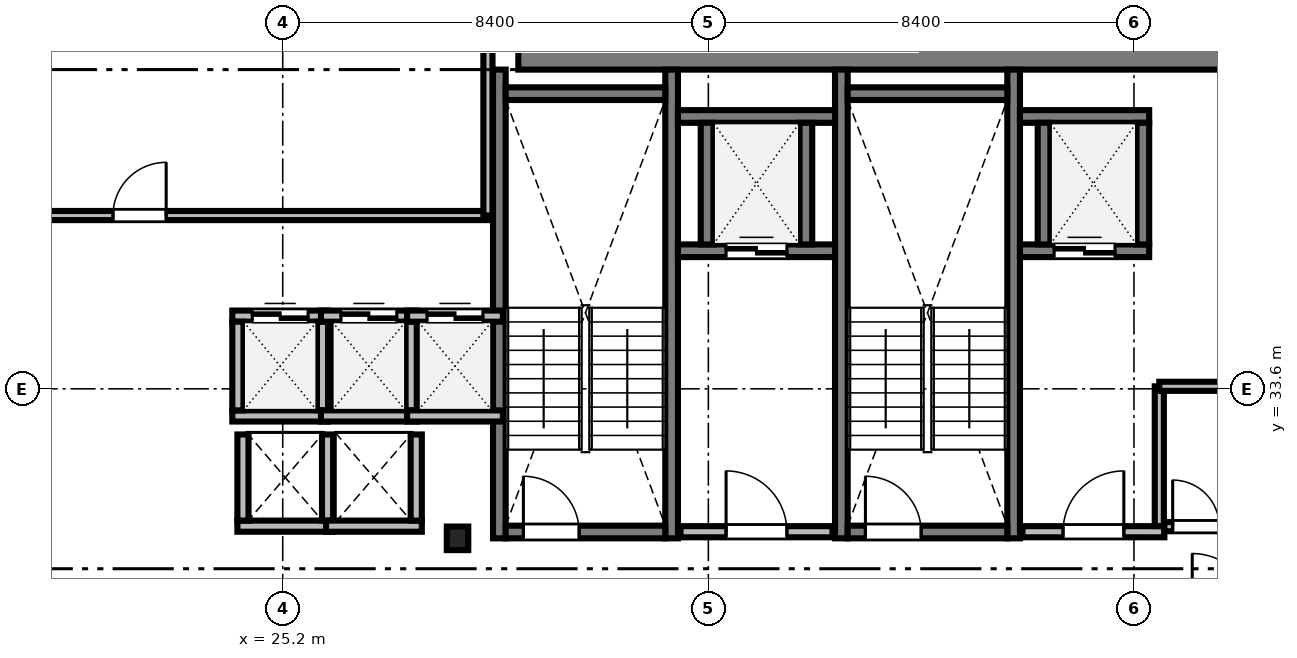
"""IFC4 building model, lengths in metres.
Left out: names, types, materials, properties, quantities, classifications, styles, units other than length and angle.
Written with IfcOpenShell. Run it as: python <this file> out.ifc"""

import sys

from ifc_helpers import new_model, si_unit, direction, frame, frame_2d, origin, origin_2d, place, context, subcontext, project, spatial, rectangle, i_section, extrude, source, transform, mapped, element, fill, save


model = new_model("IFC4")
c1 = context("Model", 3, precision=1e-05, world=origin(), true_north=direction((0.0, 1.0)))
c2 = subcontext(c1, "Body", "Model", "MODEL_VIEW")
j1 = project(units=[si_unit("LENGTHUNIT", "METRE"), si_unit("PLANEANGLEUNIT", "RADIAN")], contexts=[c1])
p1 = place(None, origin())
s1 = spatial("IfcSite", under=j1, at=p1, CompositionType="ELEMENT")
p2 = place(p1, origin())
s2 = spatial("IfcBuilding", under=s1, at=p2, CompositionType="ELEMENT")
p3 = place(p2, frame((0.0, 0.0, 107.5)))
s3 = spatial("IfcBuildingStorey", under=s2, at=p3, CompositionType="ELEMENT", Elevation=107.5)
m1 = source(origin(), c2, "Body", "SweptSolid", [
    extrude(rectangle(XDim=17.52, YDim=0.8, at=frame_2d((8.76, 0.0))), origin(), (0.0, 0.0, 1.0), 3.56),
])
p4 = place(p3, frame((29.85, 40.3, 0.0), z_axis=(0.0, 0.0, 1.0), x_axis=(1.0, 0.0, 0.0)))
e1 = element("IfcWall", 1, at=p4, inside=s3, PredefinedType="SHEAR", context=c2, shape_type="MappedRepresentation", body=[
    mapped(m1, transform((0.0, 0.0, 0.0), scale=1.0)),
])
m2 = source(origin(), c2, "Body", "SweptSolid", [
    extrude(i_section(OverallWidth=0.424, OverallDepth=0.465, WebThickness=0.035, FlangeThickness=0.056, FilletRadius=0.015, at=origin_2d()), origin(), (0.0, 0.0, 1.0), 3.56),
])
p5 = place(p3, frame((28.65, 30.65, 0.0), z_axis=(0.0, 0.0, 1.0), x_axis=(1.0, 0.0, 0.0)))
e2 = element("IfcColumn", 2, at=p5, inside=s3, PredefinedType="COLUMN", context=c2, shape_type="MappedRepresentation", body=[
    mapped(m2, transform((0.0, 0.0, 0.0), scale=1.0)),
])
m3 = source(origin(), c2, "Body", "SweptSolid", [
    extrude(rectangle(XDim=9.25, YDim=0.25, at=frame_2d((4.625, 0.0))), origin(), (0.0, 0.0, 1.0), 3.6),
])
for number, where, z_axis, x_axis in (
    (3, (29.475, 30.65, 0.0), (0.0, 0.0, 1.0), (0.0, 1.0, 0.0)),
    (4, (32.875, 30.65, 0.0), (0.0, 0.0, 1.0), (0.0, 1.0, 0.0)),
):
    element("IfcWall", number, at=place(p3, frame(where, z_axis=z_axis, x_axis=x_axis)), inside=s3, PredefinedType="SOLIDWALL", context=c2, shape_type="MappedRepresentation", body=[
        mapped(m3, transform((0.0, 0.0, 0.0), scale=1.0)),
    ])
m4 = source(origin(), c2, "Body", "SweptSolid", [
    extrude(rectangle(XDim=3.15, YDim=0.25, at=frame_2d((1.575, 0.0))), origin(), (0.0, 0.0, 1.0), 3.6),
])
p6 = place(p3, frame((29.6, 39.425, 0.0), z_axis=(0.0, 0.0, 1.0), x_axis=(1.0, 0.0, 0.0)))
e5 = element("IfcWall", 5, at=p6, inside=s3, PredefinedType="SOLIDWALL", context=c2, shape_type="MappedRepresentation", body=[
    mapped(m4, transform((0.0, 0.0, 0.0), scale=1.0)),
])
p7 = place(p3, frame((29.6, 30.775, 0.0), z_axis=(0.0, 0.0, 1.0), x_axis=(1.0, 0.0, 0.0)))
e6 = element("IfcWall", 6, at=p7, inside=s3, PredefinedType="SOLIDWALL", context=c2, shape_type="MappedRepresentation", body=[
    mapped(m4, transform((0.0, 0.0, 0.0), scale=1.0)),
])
m5 = source(origin(), c2, "Body", "SweptSolid", [
    extrude(rectangle(XDim=1.1, YDim=2.2, at=frame_2d((0.55, 1.1))), frame((0.0, 0.135, 0.0), z_axis=(0.0, -1.0, 0.0), x_axis=(1.0, 0.0, 0.0)), (0.0, 0.0, 1.0), 0.27),
])
p8 = place(p7, frame((0.35, 0.0, 0.0)))
e7 = element("IfcOpeningElement", 7, at=p8, cuts=e6, PredefinedType="OPENING", context=c2, shape_type="MappedRepresentation", body=[
    mapped(m5, transform((0.0, 0.0, 0.0), scale=1.0)),
])
for number, where, z_axis, x_axis in (
    (8, (36.225, 30.65, 0.0), (0.0, 0.0, 1.0), (0.0, 1.0, 0.0)),
    (9, (39.625, 30.65, 0.0), (0.0, 0.0, 1.0), (0.0, 1.0, 0.0)),
):
    element("IfcWall", number, at=place(p3, frame(where, z_axis=z_axis, x_axis=x_axis)), inside=s3, PredefinedType="SOLIDWALL", context=c2, shape_type="MappedRepresentation", body=[
        mapped(m3, transform((0.0, 0.0, 0.0), scale=1.0)),
    ])
p9 = place(p3, frame((36.35, 39.425, 0.0), z_axis=(0.0, 0.0, 1.0), x_axis=(1.0, 0.0, 0.0)))
e10 = element("IfcWall", 10, at=p9, inside=s3, PredefinedType="SOLIDWALL", context=c2, shape_type="MappedRepresentation", body=[
    mapped(m4, transform((0.0, 0.0, 0.0), scale=1.0)),
])
p10 = place(p3, frame((36.35, 30.775, 0.0), z_axis=(0.0, 0.0, 1.0), x_axis=(1.0, 0.0, 0.0)))
e11 = element("IfcWall", 11, at=p10, inside=s3, PredefinedType="SOLIDWALL", context=c2, shape_type="MappedRepresentation", body=[
    mapped(m4, transform((0.0, 0.0, 0.0), scale=1.0)),
])
p11 = place(p10, frame((0.35, 0.0, 0.0)))
e12 = element("IfcOpeningElement", 12, at=p11, cuts=e11, PredefinedType="OPENING", context=c2, shape_type="MappedRepresentation", body=[
    mapped(m5, transform((0.0, 0.0, 0.0), scale=1.0)),
])
m6 = source(origin(), c2, "Body", "SweptSolid", [
    extrude(rectangle(XDim=3.0, YDim=0.22, at=frame_2d((1.5, 0.0))), origin(), (0.0, 0.0, 1.0), 3.56),
])
p12 = place(p3, frame((33.05, 30.78, 0.0), z_axis=(0.0, 0.0, 1.0), x_axis=(1.0, 0.0, 0.0)))
e13 = element("IfcWall", 13, at=p12, inside=s3, PredefinedType="SOLIDWALL", context=c2, shape_type="MappedRepresentation", body=[
    mapped(m6, transform((0.0, 0.0, 0.0), scale=1.0)),
])
m7 = source(origin(), c2, "Body", "SweptSolid", [
    extrude(rectangle(XDim=1.2, YDim=2.2, at=frame_2d((0.6, 1.1))), frame((0.0, 0.12, 0.0), z_axis=(0.0, -1.0, 0.0), x_axis=(1.0, 0.0, 0.0)), (0.0, 0.0, 1.0), 0.24),
])
p13 = place(p12, frame((0.9, 0.0, 0.0)))
e14 = element("IfcOpeningElement", 14, at=p13, cuts=e13, PredefinedType="OPENING", context=c2, shape_type="MappedRepresentation", body=[
    mapped(m7, transform((0.0, 0.0, 0.0), scale=1.0)),
])
m8 = source(origin(), c2, "Body", "SweptSolid", [
    extrude(rectangle(XDim=2.8, YDim=0.22, at=frame_2d((1.4, 0.0))), origin(), (0.0, 0.0, 1.0), 3.56),
])
p14 = place(p3, frame((39.8, 30.78, 0.0), z_axis=(0.0, 0.0, 1.0), x_axis=(1.0, 0.0, 0.0)))
e15 = element("IfcWall", 15, at=p14, inside=s3, PredefinedType="SOLIDWALL", context=c2, shape_type="MappedRepresentation", body=[
    mapped(m8, transform((0.0, 0.0, 0.0), scale=1.0)),
])
p15 = place(p14, frame((0.8, 0.0, 0.0)))
e16 = element("IfcOpeningElement", 16, at=p15, cuts=e15, PredefinedType="OPENING", context=c2, shape_type="MappedRepresentation", body=[
    mapped(m7, transform((0.0, 0.0, 0.0), scale=1.0)),
])
m9 = source(origin(), c2, "Body", "SweptSolid", [
    extrude(rectangle(XDim=1.89, YDim=0.22, at=frame_2d((0.945, 0.0))), origin(), (0.0, 0.0, 1.0), 3.56),
])
p16 = place(p3, frame((24.205, 33.065, 0.0), z_axis=(0.0, 0.0, 1.0), x_axis=(1.0, 0.0, 0.0)))
e17 = element("IfcWall", 17, at=p16, inside=s3, PredefinedType="SOLIDWALL", context=c2, shape_type="MappedRepresentation", body=[
    mapped(m9, transform((0.0, 0.0, 0.0), scale=1.0)),
])
p17 = place(p3, frame((24.205, 35.035, 0.0), z_axis=(0.0, 0.0, 1.0), x_axis=(1.0, 0.0, 0.0)))
e18 = element("IfcWall", 18, at=p17, inside=s3, PredefinedType="SOLIDWALL", context=c2, shape_type="MappedRepresentation", body=[
    mapped(m9, transform((0.0, 0.0, 0.0), scale=1.0)),
])
m10 = source(origin(), c2, "Body", "SweptSolid", [
    extrude(rectangle(XDim=1.1, YDim=2.2, at=frame_2d((0.55, 1.1))), frame((0.0, 0.12, 0.0), z_axis=(0.0, -1.0, 0.0), x_axis=(1.0, 0.0, 0.0)), (0.0, 0.0, 1.0), 0.24),
])
p18 = place(p17, frame((0.395, 0.0, 0.0)))
e19 = element("IfcOpeningElement", 19, at=p18, cuts=e18, PredefinedType="OPENING", context=c2, shape_type="MappedRepresentation", body=[
    mapped(m10, transform((0.0, 0.0, 0.0), scale=1.0)),
])
m11 = source(origin(), c2, "Body", "SweptSolid", [
    extrude(rectangle(XDim=1.75, YDim=0.22, at=frame_2d((0.875, 0.0))), origin(), (0.0, 0.0, 1.0), 3.56),
])
for number, where, z_axis, x_axis in (
    (20, (24.315, 33.175, 0.0), (0.0, 0.0, 1.0), (0.0, 1.0, 0.0)),
    (21, (25.985, 33.175, 0.0), (0.0, 0.0, 1.0), (0.0, 1.0, 0.0)),
):
    element("IfcWall", number, at=place(p3, frame(where, z_axis=z_axis, x_axis=x_axis)), inside=s3, PredefinedType="SOLIDWALL", context=c2, shape_type="MappedRepresentation", body=[
        mapped(m11, transform((0.0, 0.0, 0.0), scale=1.0)),
    ])
p19 = place(p3, frame((25.955, 33.065, 0.0), z_axis=(0.0, 0.0, 1.0), x_axis=(1.0, 0.0, 0.0)))
e22 = element("IfcWall", 22, at=p19, inside=s3, PredefinedType="SOLIDWALL", context=c2, shape_type="MappedRepresentation", body=[
    mapped(m9, transform((0.0, 0.0, 0.0), scale=1.0)),
])
p20 = place(p3, frame((25.955, 35.035, 0.0), z_axis=(0.0, 0.0, 1.0), x_axis=(1.0, 0.0, 0.0)))
e23 = element("IfcWall", 23, at=p20, inside=s3, PredefinedType="SOLIDWALL", context=c2, shape_type="MappedRepresentation", body=[
    mapped(m9, transform((0.0, 0.0, 0.0), scale=1.0)),
])
p21 = place(p20, frame((0.395, 0.0, 0.0)))
e24 = element("IfcOpeningElement", 24, at=p21, cuts=e23, PredefinedType="OPENING", context=c2, shape_type="MappedRepresentation", body=[
    mapped(m10, transform((0.0, 0.0, 0.0), scale=1.0)),
])
p22 = place(p3, frame((27.735, 33.175, 0.0), z_axis=(0.0, 0.0, 1.0), x_axis=(0.0, 1.0, 0.0)))
e25 = element("IfcWall", 25, at=p22, inside=s3, PredefinedType="SOLIDWALL", context=c2, shape_type="MappedRepresentation", body=[
    mapped(m11, transform((0.0, 0.0, 0.0), scale=1.0)),
])
p23 = place(p3, frame((27.655, 33.065, 0.0), z_axis=(0.0, 0.0, 1.0), x_axis=(1.0, 0.0, 0.0)))
e26 = element("IfcWall", 26, at=p23, inside=s3, PredefinedType="SOLIDWALL", context=c2, shape_type="MappedRepresentation", body=[
    mapped(m9, transform((0.0, 0.0, 0.0), scale=1.0)),
])
p24 = place(p3, frame((27.655, 35.035, 0.0), z_axis=(0.0, 0.0, 1.0), x_axis=(1.0, 0.0, 0.0)))
e27 = element("IfcWall", 27, at=p24, inside=s3, PredefinedType="SOLIDWALL", context=c2, shape_type="MappedRepresentation", body=[
    mapped(m9, transform((0.0, 0.0, 0.0), scale=1.0)),
])
p25 = place(p24, frame((0.395, 0.0, 0.0)))
e28 = element("IfcOpeningElement", 28, at=p25, cuts=e27, PredefinedType="OPENING", context=c2, shape_type="MappedRepresentation", body=[
    mapped(m10, transform((0.0, 0.0, 0.0), scale=1.0)),
])
m12 = source(origin(), c2, "Body", "SweptSolid", [
    extrude(rectangle(XDim=3.1, YDim=0.25, at=frame_2d((1.55, 0.0))), origin(), (0.0, 0.0, 1.0), 3.56),
])
p26 = place(p3, frame((33.0, 36.325, 0.0), z_axis=(0.0, 0.0, 1.0), x_axis=(1.0, 0.0, 0.0)))
e29 = element("IfcWall", 29, at=p26, inside=s3, PredefinedType="SOLIDWALL", context=c2, shape_type="MappedRepresentation", body=[
    mapped(m12, transform((0.0, 0.0, 0.0), scale=1.0)),
])
m13 = source(origin(), c2, "Body", "SweptSolid", [
    extrude(rectangle(XDim=1.2, YDim=2.25, at=frame_2d((0.6, 1.125))), frame((0.0, 0.135, 0.0), z_axis=(0.0, -1.0, 0.0), x_axis=(1.0, 0.0, 0.0)), (0.0, 0.0, 1.0), 0.27),
])
p27 = place(p26, frame((0.95, 0.0, 0.0)))
e30 = element("IfcOpeningElement", 30, at=p27, cuts=e29, PredefinedType="OPENING", context=c2, shape_type="MappedRepresentation", body=[
    mapped(m13, transform((0.0, 0.0, 0.0), scale=1.0)),
])
p28 = place(p3, frame((33.0, 38.975, 0.0), z_axis=(0.0, 0.0, 1.0), x_axis=(1.0, 0.0, 0.0)))
e31 = element("IfcWall", 31, at=p28, inside=s3, PredefinedType="SOLIDWALL", context=c2, shape_type="MappedRepresentation", body=[
    mapped(m12, transform((0.0, 0.0, 0.0), scale=1.0)),
])
m14 = source(origin(), c2, "Body", "SweptSolid", [
    extrude(rectangle(XDim=2.4, YDim=0.25, at=frame_2d((1.2, 0.0))), origin(), (0.0, 0.0, 1.0), 3.56),
])
for number, where, z_axis, x_axis in (
    (32, (33.575, 36.45, 0.0), (0.0, 0.0, 1.0), (0.0, 1.0, 0.0)),
    (33, (35.525, 36.45, 0.0), (0.0, 0.0, 1.0), (0.0, 1.0, 0.0)),
):
    element("IfcWall", number, at=place(p3, frame(where, z_axis=z_axis, x_axis=x_axis)), inside=s3, PredefinedType="SOLIDWALL", context=c2, shape_type="MappedRepresentation", body=[
        mapped(m14, transform((0.0, 0.0, 0.0), scale=1.0)),
    ])
m15 = source(origin(), c2, "Body", "SweptSolid", [
    extrude(rectangle(XDim=2.55, YDim=0.25, at=frame_2d((1.275, 0.0))), origin(), (0.0, 0.0, 1.0), 3.56),
])
p29 = place(p3, frame((39.75, 36.325, 0.0), z_axis=(0.0, 0.0, 1.0), x_axis=(1.0, 0.0, 0.0)))
e34 = element("IfcWall", 34, at=p29, inside=s3, PredefinedType="SOLIDWALL", context=c2, shape_type="MappedRepresentation", body=[
    mapped(m15, transform((0.0, 0.0, 0.0), scale=1.0)),
])
p30 = place(p29, frame((0.675, 0.0, 0.0)))
e35 = element("IfcOpeningElement", 35, at=p30, cuts=e34, PredefinedType="OPENING", context=c2, shape_type="MappedRepresentation", body=[
    mapped(m13, transform((0.0, 0.0, 0.0), scale=1.0)),
])
p31 = place(p3, frame((39.75, 38.975, 0.0), z_axis=(0.0, 0.0, 1.0), x_axis=(1.0, 0.0, 0.0)))
e36 = element("IfcWall", 36, at=p31, inside=s3, PredefinedType="SOLIDWALL", context=c2, shape_type="MappedRepresentation", body=[
    mapped(m15, transform((0.0, 0.0, 0.0), scale=1.0)),
])
for number, where, z_axis, x_axis in (
    (37, (40.225, 36.45, 0.0), (0.0, 0.0, 1.0), (0.0, 1.0, 0.0)),
    (38, (42.175, 36.45, 0.0), (0.0, 0.0, 1.0), (0.0, 1.0, 0.0)),
):
    element("IfcWall", number, at=place(p3, frame(where, z_axis=z_axis, x_axis=x_axis)), inside=s3, PredefinedType="SOLIDWALL", context=c2, shape_type="MappedRepresentation", body=[
        mapped(m14, transform((0.0, 0.0, 0.0), scale=1.0)),
    ])
m16 = source(origin(), c2, "Body", "SweptSolid", [
    extrude(rectangle(XDim=1.89, YDim=0.22, at=frame_2d((0.945, 0.0))), origin(), (0.0, 0.0, 1.0), 3.56),
])
p32 = place(p3, frame((24.305, 30.89, 0.0), z_axis=(0.0, 0.0, 1.0), x_axis=(1.0, 0.0, 0.0)))
e39 = element("IfcWall", 39, at=p32, inside=s3, PredefinedType="SOLIDWALL", context=c2, shape_type="MappedRepresentation", body=[
    mapped(m16, transform((0.0, 0.0, 0.0), scale=1.0)),
])
m17 = source(origin(), c2, "Body", "SweptSolid", [
    extrude(rectangle(XDim=1.7, YDim=0.22, at=frame_2d((0.85, 0.0))), origin(), (0.0, 0.0, 1.0), 3.56),
])
for number, where, z_axis, x_axis in (
    (40, (24.415, 31.0, 0.0), (0.0, 0.0, 1.0), (0.0, 1.0, 0.0)),
    (41, (26.085, 31.0, 0.0), (0.0, 0.0, 1.0), (0.0, 1.0, 0.0)),
):
    element("IfcWall", number, at=place(p3, frame(where, z_axis=z_axis, x_axis=x_axis)), inside=s3, PredefinedType="SOLIDWALL", context=c2, shape_type="MappedRepresentation", body=[
        mapped(m17, transform((0.0, 0.0, 0.0), scale=1.0)),
    ])
p33 = place(p3, frame((26.055, 30.89, 0.0), z_axis=(0.0, 0.0, 1.0), x_axis=(1.0, 0.0, 0.0)))
e42 = element("IfcWall", 42, at=p33, inside=s3, PredefinedType="SOLIDWALL", context=c2, shape_type="MappedRepresentation", body=[
    mapped(m16, transform((0.0, 0.0, 0.0), scale=1.0)),
])
p34 = place(p3, frame((27.835, 31.0, 0.0), z_axis=(0.0, 0.0, 1.0), x_axis=(0.0, 1.0, 0.0)))
e43 = element("IfcWall", 43, at=p34, inside=s3, PredefinedType="SOLIDWALL", context=c2, shape_type="MappedRepresentation", body=[
    mapped(m17, transform((0.0, 0.0, 0.0), scale=1.0)),
])
m18 = source(origin(), c2, "Body", "SweptSolid", [
    extrude(rectangle(XDim=22.328, YDim=0.18, at=frame_2d((11.164, 0.0))), origin(), (0.0, 0.0, 1.0), 2.802),
])
p35 = place(p3, frame((6.922, 37.02, 0.0), z_axis=(0.0, 0.0, 1.0), x_axis=(1.0, 0.0, 0.0)))
e44 = element("IfcWall", 44, at=p35, inside=s3, PredefinedType="PARTITIONING", context=c2, shape_type="MappedRepresentation", body=[
    mapped(m18, transform((0.0, 0.0, 0.0), scale=1.0)),
])
m19 = source(origin(), c2, "Body", "SweptSolid", [
    extrude(rectangle(XDim=1.05, YDim=2.2, at=frame_2d((0.525, 1.1))), frame((0.0, 0.1, 0.0), z_axis=(0.0, -1.0, 0.0), x_axis=(1.0, 0.0, 0.0)), (0.0, 0.0, 1.0), 0.2),
])
p36 = place(p35, frame((14.928, 0.0, 0.0)))
e45 = element("IfcOpeningElement", 45, at=p36, cuts=e44, PredefinedType="OPENING", context=c2, shape_type="MappedRepresentation", body=[
    mapped(m19, transform((0.0, 0.0, 0.0), scale=1.0)),
])
m20 = source(origin(), c2, "Body", "SweptSolid", [
    extrude(rectangle(XDim=1.248, YDim=0.18, at=frame_2d((0.624, 0.0))), origin(), (0.0, 0.0, 1.0), 3.56),
])
p37 = place(p3, frame((42.6, 30.88, 0.0), z_axis=(0.0, 0.0, 1.0), x_axis=(1.0, 0.0, 0.0)))
e46 = element("IfcWall", 46, at=p37, inside=s3, PredefinedType="PARTITIONING", context=c2, shape_type="MappedRepresentation", body=[
    mapped(m20, transform((0.0, 0.0, 0.0), scale=1.0)),
])
m21 = source(origin(), c2, "Body", "SweptSolid", [
    extrude(rectangle(XDim=0.92, YDim=2.1, at=frame_2d((0.46, 1.05))), frame((0.0, 0.1, 0.0), z_axis=(0.0, -1.0, 0.0), x_axis=(1.0, 0.0, 0.0)), (0.0, 0.0, 1.0), 0.2),
])
p38 = place(p37, frame((0.164, 0.0, 0.0)))
e47 = element("IfcOpeningElement", 47, at=p38, cuts=e46, PredefinedType="OPENING", context=c2, shape_type="MappedRepresentation", body=[
    mapped(m21, transform((0.0, 0.0, 0.0), scale=1.0)),
])
m22 = source(origin(), c2, "Body", "SweptSolid", [
    extrude(rectangle(XDim=11.45, YDim=0.18, at=frame_2d((5.725, 0.0))), origin(), (0.0, 0.0, 1.0), 2.802),
])
p39 = place(p3, frame((29.25, 37.02, 0.0), z_axis=(0.0, 0.0, 1.0), x_axis=(0.0, 1.0, 0.0)))
e48 = element("IfcWall", 48, at=p39, inside=s3, PredefinedType="PARTITIONING", context=c2, shape_type="MappedRepresentation", body=[
    mapped(m22, transform((0.0, 0.0, 0.0), scale=1.0)),
])
m23 = source(origin(), c2, "Body", "SweptSolid", [
    extrude(rectangle(XDim=2.758, YDim=0.18, at=frame_2d((1.379, 0.0))), origin(), (0.0, 0.0, 1.0), 3.56),
])
p40 = place(p3, frame((42.5, 30.892, 0.0), z_axis=(0.0, 0.0, 1.0), x_axis=(0.0, 1.0, 0.0)))
e49 = element("IfcWall", 49, at=p40, inside=s3, PredefinedType="PARTITIONING", context=c2, shape_type="MappedRepresentation", body=[
    mapped(m23, transform((0.0, 0.0, 0.0), scale=1.0)),
])
m24 = source(origin(), c2, "Body", "SweptSolid", [
    extrude(rectangle(XDim=1.348, YDim=0.18, at=frame_2d((0.674, 0.0))), origin(), (0.0, 0.0, 1.0), 3.56),
])
p41 = place(p3, frame((42.5, 33.65, 0.0), z_axis=(0.0, 0.0, 1.0), x_axis=(1.0, 0.0, 0.0)))
e50 = element("IfcWall", 50, at=p41, inside=s3, PredefinedType="PARTITIONING", context=c2, shape_type="MappedRepresentation", body=[
    mapped(m24, transform((0.0, 0.0, 0.0), scale=1.0)),
])
m25 = source(origin(), c2, "Body", "SweptSolid", [
    extrude(rectangle(XDim=1.1, YDim=2.2, at=frame_2d((0.55, 1.1))), frame((0.0, 0.025, 0.0), z_axis=(0.0, -1.0, 0.0), x_axis=(1.0, 0.0, 0.0)), (0.0, 0.0, 1.0), 0.05),
])
p42 = place(p8, origin())
e51 = element("IfcDoor", 51, at=p42, inside=s3, OperationType="SINGLE_SWING_LEFT", PredefinedType="DOOR", context=c2, shape_type="MappedRepresentation", body=[
    mapped(m25, transform((0.0, 0.0, 0.0), scale=1.0)),
])
fill(e7, e51)
p43 = place(p11, origin())
e52 = element("IfcDoor", 52, at=p43, inside=s3, OperationType="SINGLE_SWING_LEFT", PredefinedType="DOOR", context=c2, shape_type="MappedRepresentation", body=[
    mapped(m25, transform((0.0, 0.0, 0.0), scale=1.0)),
])
fill(e12, e52)
m26 = source(origin(), c2, "Body", "SweptSolid", [
    extrude(rectangle(XDim=1.2, YDim=2.2, at=frame_2d((0.6, 1.1))), frame((0.0, 0.025, 0.0), z_axis=(0.0, -1.0, 0.0), x_axis=(1.0, 0.0, 0.0)), (0.0, 0.0, 1.0), 0.05),
])
p44 = place(p13, origin())
e53 = element("IfcDoor", 53, at=p44, inside=s3, OperationType="SINGLE_SWING_LEFT", PredefinedType="DOOR", context=c2, shape_type="MappedRepresentation", body=[
    mapped(m26, transform((0.0, 0.0, 0.0), scale=1.0)),
])
fill(e14, e53)
p45 = place(p15, origin())
e54 = element("IfcDoor", 54, at=p45, inside=s3, OperationType="SINGLE_SWING_RIGHT", PredefinedType="DOOR", context=c2, shape_type="MappedRepresentation", body=[
    mapped(m26, transform((0.0, 0.0, 0.0), scale=1.0)),
])
fill(e16, e54)
p46 = place(p18, origin())
e55 = element("IfcDoor", 55, at=p46, inside=s3, OperationType="DOUBLE_DOOR_SLIDING", PredefinedType="DOOR", context=c2, shape_type="MappedRepresentation", body=[
    mapped(m25, transform((0.0, 0.0, 0.0), scale=1.0)),
])
fill(e19, e55)
p47 = place(p21, origin())
e56 = element("IfcDoor", 56, at=p47, inside=s3, OperationType="DOUBLE_DOOR_SLIDING", PredefinedType="DOOR", context=c2, shape_type="MappedRepresentation", body=[
    mapped(m25, transform((0.0, 0.0, 0.0), scale=1.0)),
])
fill(e24, e56)
p48 = place(p25, origin())
e57 = element("IfcDoor", 57, at=p48, inside=s3, OperationType="DOUBLE_DOOR_SLIDING", PredefinedType="DOOR", context=c2, shape_type="MappedRepresentation", body=[
    mapped(m25, transform((0.0, 0.0, 0.0), scale=1.0)),
])
fill(e28, e57)
m27 = source(origin(), c2, "Body", "SweptSolid", [
    extrude(rectangle(XDim=1.2, YDim=2.25, at=frame_2d((0.6, 1.125))), frame((0.0, 0.025, 0.0), z_axis=(0.0, -1.0, 0.0), x_axis=(1.0, 0.0, 0.0)), (0.0, 0.0, 1.0), 0.05),
])
p49 = place(p27, origin())
e58 = element("IfcDoor", 58, at=p49, inside=s3, OperationType="DOUBLE_DOOR_SLIDING", PredefinedType="DOOR", context=c2, shape_type="MappedRepresentation", body=[
    mapped(m27, transform((0.0, 0.0, 0.0), scale=1.0)),
])
fill(e30, e58)
p50 = place(p30, origin())
e59 = element("IfcDoor", 59, at=p50, inside=s3, OperationType="DOUBLE_DOOR_SLIDING", PredefinedType="DOOR", context=c2, shape_type="MappedRepresentation", body=[
    mapped(m27, transform((0.0, 0.0, 0.0), scale=1.0)),
])
fill(e35, e59)
m28 = source(origin(), c2, "Body", "SweptSolid", [
    extrude(rectangle(XDim=1.05, YDim=2.2, at=frame_2d((0.525, 1.1))), frame((0.0, 0.025, 0.0), z_axis=(0.0, -1.0, 0.0), x_axis=(1.0, 0.0, 0.0)), (0.0, 0.0, 1.0), 0.05),
])
p51 = place(p36, origin())
e60 = element("IfcDoor", 60, at=p51, inside=s3, OperationType="SINGLE_SWING_RIGHT", PredefinedType="DOOR", context=c2, shape_type="MappedRepresentation", body=[
    mapped(m28, transform((0.0, 0.0, 0.0), scale=1.0)),
])
fill(e45, e60)
m29 = source(origin(), c2, "Body", "SweptSolid", [
    extrude(rectangle(XDim=0.92, YDim=2.1, at=frame_2d((0.46, 1.05))), frame((0.0, 0.025, 0.0), z_axis=(0.0, -1.0, 0.0), x_axis=(1.0, 0.0, 0.0)), (0.0, 0.0, 1.0), 0.05),
])
p52 = place(p38, origin())
e61 = element("IfcDoor", 61, at=p52, inside=s3, OperationType="SINGLE_SWING_LEFT", PredefinedType="DOOR", context=c2, shape_type="MappedRepresentation", body=[
    mapped(m29, transform((0.0, 0.0, 0.0), scale=1.0)),
])
fill(e47, e61)
save(model, sys.argv[1])
